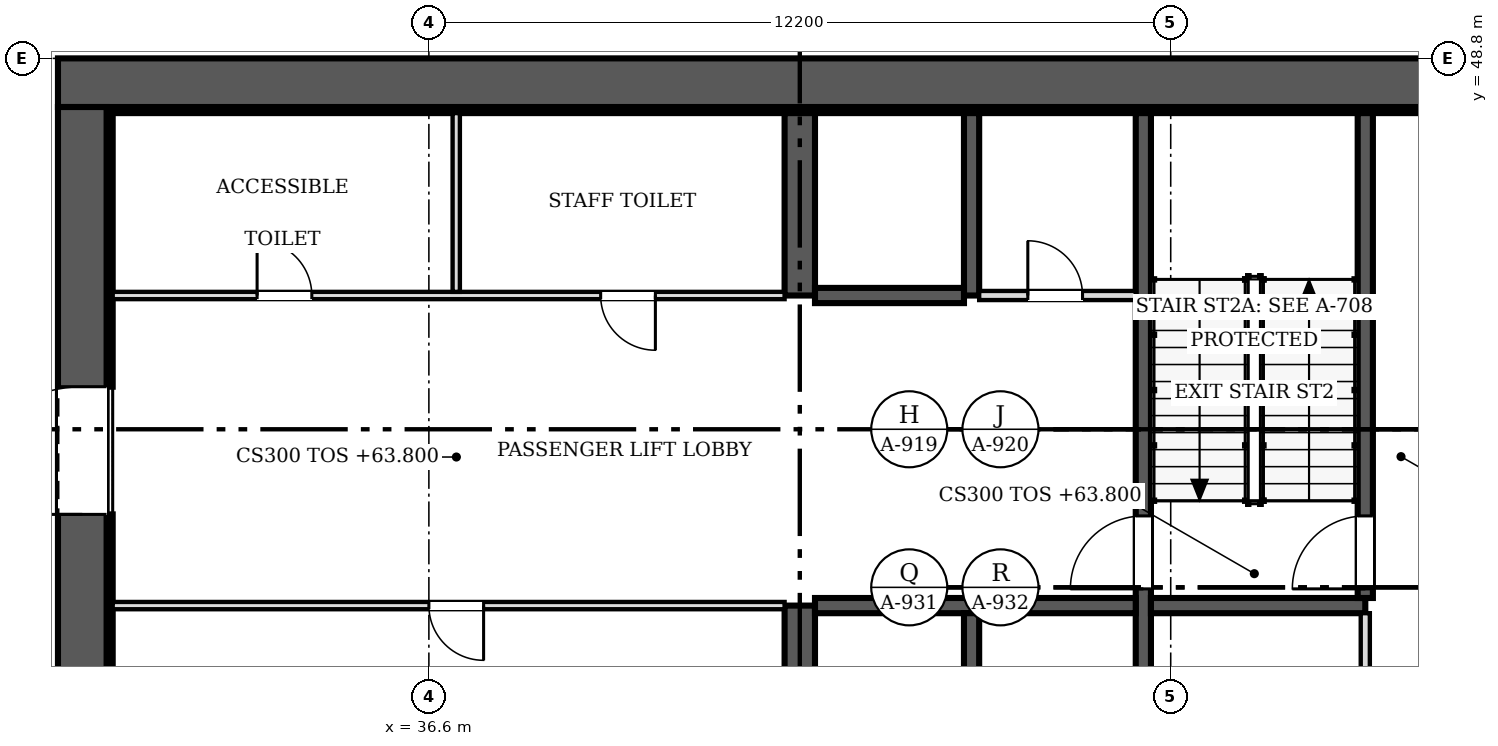
"""IFC4 building model, lengths in metres.
Left out: names, types, materials, properties, quantities, classifications, styles, units other than length and angle.
Written with IfcOpenShell. Run it as: python <this file> out.ifc"""

import sys

from ifc_helpers import new_model, si_unit, direction, frame, frame_2d, origin, place, context, subcontext, project, spatial, rectangle, extrude, source, transform, mapped, element, fill, save


model = new_model("IFC4")
c1 = context("Model", 3, precision=1e-05, world=origin(), true_north=direction((0.0, 1.0)))
c2 = subcontext(c1, "Body", "Model", "MODEL_VIEW")
j1 = project(units=[si_unit("LENGTHUNIT", "METRE"), si_unit("PLANEANGLEUNIT", "RADIAN")], contexts=[c1])
p1 = place(None, origin())
s1 = spatial("IfcSite", under=j1, at=p1, CompositionType="ELEMENT")
p2 = place(p1, origin())
s2 = spatial("IfcBuilding", under=s1, at=p2, CompositionType="ELEMENT")
p3 = place(p2, frame((0.0, 0.0, 63.8)))
s3 = spatial("IfcBuildingStorey", under=s2, at=p3, CompositionType="ELEMENT", Elevation=63.8)
p4 = place(p3, frame((30.9, 25.2, 0.0), z_axis=(0.0, 0.0, 1.0), x_axis=(0.0, 1.0, 0.0)))
e1 = element("IfcWall", 1, at=p4, inside=s3, PredefinedType="SHEAR", context=c2, shape_type="SweptSolid", body=[
    extrude(rectangle(XDim=22.8, YDim=0.8, at=frame_2d((11.4, 0.0))), origin(), (0.0, 0.0, 1.0), 4.8),
])
m1 = source(origin(), c2, "Body", "SweptSolid", [
    extrude(rectangle(XDim=2.1, YDim=2.4, at=frame_2d((1.05, 1.2))), frame((0.0, 0.41, 0.0), z_axis=(0.0, -1.0, 0.0), x_axis=(1.0, 0.0, 0.0)), (0.0, 0.0, 1.0), 0.82),
])
p5 = place(p4, frame((4.6, 0.0, 0.0)))
e2 = element("IfcOpeningElement", 2, at=p5, cuts=e1, PredefinedType="OPENING", context=c2, shape_type="MappedRepresentation", body=[
    mapped(m1, transform((0.0, 0.0, 0.0), scale=1.0)),
])
p6 = place(p4, frame((16.1, 0.0, 0.0)))
e3 = element("IfcOpeningElement", 3, at=p6, cuts=e1, PredefinedType="OPENING", context=c2, shape_type="MappedRepresentation", body=[
    mapped(m1, transform((0.0, 0.0, 0.0), scale=1.0)),
])
p7 = place(p3, frame((30.5, 48.4, 0.0), z_axis=(0.0, 0.0, 1.0), x_axis=(1.0, 0.0, 0.0)))
e4 = element("IfcWall", 4, at=p7, inside=s3, PredefinedType="SHEAR", context=c2, shape_type="SweptSolid", body=[
    extrude(rectangle(XDim=24.4, YDim=0.8, at=frame_2d((12.2, 0.0))), origin(), (0.0, 0.0, 1.0), 4.8),
])
p8 = place(p3, frame((31.3, 47.95, 0.0), z_axis=(0.0, 0.0, 1.0), x_axis=(1.0, 0.0, 0.0)))
e5 = element("IfcWall", 5, at=p8, inside=s3, PredefinedType="SOLIDWALL", context=c2, shape_type="SweptSolid", body=[
    extrude(rectangle(XDim=22.8, YDim=0.1, at=frame_2d((11.4, 0.0))), origin(), (0.0, 0.0, 1.0), 4.8),
])
p9 = place(p3, frame((31.35, 31.9, 0.0), z_axis=(0.0, 0.0, 1.0), x_axis=(0.0, 1.0, 0.0)))
e6 = element("IfcWall", 6, at=p9, inside=s3, PredefinedType="SOLIDWALL", context=c2, shape_type="SweptSolid", body=[
    extrude(rectangle(XDim=9.4, YDim=0.1, at=frame_2d((4.7, 0.0))), origin(), (0.0, 0.0, 1.0), 4.8),
])
p10 = place(p3, frame((31.35, 43.4, 0.0), z_axis=(0.0, 0.0, 1.0), x_axis=(0.0, 1.0, 0.0)))
e7 = element("IfcWall", 7, at=p10, inside=s3, PredefinedType="SOLIDWALL", context=c2, shape_type="SweptSolid", body=[
    extrude(rectangle(XDim=4.5, YDim=0.1, at=frame_2d((2.25, 0.0))), origin(), (0.0, 0.0, 1.0), 4.8),
])
p11 = place(p3, frame((42.7, 36.85, 0.0), z_axis=(0.0, 0.0, 1.0), x_axis=(0.0, 1.0, 0.0)))
e8 = element("IfcWall", 8, at=p11, inside=s3, PredefinedType="SHEAR", context=c2, shape_type="SweptSolid", body=[
    extrude(rectangle(XDim=2.95, YDim=0.5, at=frame_2d((1.475, 0.0))), origin(), (0.0, 0.0, 1.0), 4.8),
])
p12 = place(p3, frame((42.7, 44.9, 0.0), z_axis=(0.0, 0.0, 1.0), x_axis=(0.0, 1.0, 0.0)))
e9 = element("IfcWall", 9, at=p12, inside=s3, PredefinedType="SHEAR", context=c2, shape_type="SweptSolid", body=[
    extrude(rectangle(XDim=3.0, YDim=0.5, at=frame_2d((1.5, 0.0))), origin(), (0.0, 0.0, 1.0), 4.8),
])
p13 = place(p3, frame((48.35, 47.9, 0.0), z_axis=(0.0, 0.0, 1.0), x_axis=(0.0, -1.0, 0.0)))
e10 = element("IfcWall", 10, at=p13, inside=s3, PredefinedType="SOLIDWALL", context=c2, shape_type="SweptSolid", body=[
    extrude(rectangle(XDim=11.05, YDim=0.25, at=frame_2d((5.525, 0.0))), origin(), (0.0, 0.0, 1.0), 4.8),
])
m2 = source(origin(), c2, "Body", "SweptSolid", [
    extrude(rectangle(XDim=1.2, YDim=2.1, at=frame_2d((0.6, 1.05))), frame((0.0, 0.135, 0.0), z_axis=(0.0, -1.0, 0.0), x_axis=(1.0, 0.0, 0.0)), (0.0, 0.0, 1.0), 0.27),
])
p14 = place(p13, frame((6.625, 0.0, 0.0)))
e11 = element("IfcOpeningElement", 11, at=p14, cuts=e10, PredefinedType="OPENING", context=c2, shape_type="MappedRepresentation", body=[
    mapped(m2, transform((0.0, 0.0, 0.0), scale=1.0)),
])
p15 = place(p3, frame((42.95, 39.8, 0.0), z_axis=(0.0, 0.0, 1.0), x_axis=(1.0, 0.0, 0.0)))
e12 = element("IfcWall", 12, at=p15, inside=s3, PredefinedType="SOLIDWALL", context=c2, shape_type="SweptSolid", body=[
    extrude(rectangle(XDim=5.275, YDim=0.25, at=frame_2d((2.638, 0.0))), origin(), (0.0, 0.0, 1.0), 4.8),
])
p16 = place(p3, frame((48.475, 39.8, 0.0), z_axis=(0.0, 0.0, 1.0), x_axis=(1.0, 0.0, 0.0)))
e13 = element("IfcWall", 13, at=p16, inside=s3, PredefinedType="SOLIDWALL", context=c2, shape_type="SweptSolid", body=[
    extrude(rectangle(XDim=3.525, YDim=0.25, at=frame_2d((1.762, 0.0))), origin(), (0.0, 0.0, 1.0), 4.8),
])
p17 = place(p3, frame((52.0, 39.925, 0.0), z_axis=(0.0, 0.0, 1.0), x_axis=(0.0, 1.0, 0.0)))
e14 = element("IfcWall", 14, at=p17, inside=s3, PredefinedType="SOLIDWALL", context=c2, shape_type="SweptSolid", body=[
    extrude(rectangle(XDim=7.975, YDim=0.25, at=frame_2d((3.987, 0.0))), origin(), (0.0, 0.0, 1.0), 4.8),
])
p18 = place(p17, frame((0.15, 0.0, 0.0)))
e15 = element("IfcOpeningElement", 15, at=p18, cuts=e14, PredefinedType="OPENING", context=c2, shape_type="MappedRepresentation", body=[
    mapped(m2, transform((0.0, 0.0, 0.0), scale=1.0)),
])
p19 = place(p3, frame((45.525, 36.85, 0.0), z_axis=(0.0, 0.0, 1.0), x_axis=(0.0, 1.0, 0.0)))
e16 = element("IfcWall", 16, at=p19, inside=s3, PredefinedType="SOLIDWALL", context=c2, shape_type="SweptSolid", body=[
    extrude(rectangle(XDim=2.825, YDim=0.25, at=frame_2d((1.413, 0.0))), origin(), (0.0, 0.0, 1.0), 4.8),
])
p20 = place(p3, frame((45.525, 44.9, 0.0), z_axis=(0.0, 0.0, 1.0), x_axis=(0.0, 1.0, 0.0)))
e17 = element("IfcWall", 17, at=p20, inside=s3, PredefinedType="SOLIDWALL", context=c2, shape_type="SweptSolid", body=[
    extrude(rectangle(XDim=3.0, YDim=0.25, at=frame_2d((1.5, 0.0))), origin(), (0.0, 0.0, 1.0), 4.8),
])
p21 = place(p3, frame((42.95, 44.9, 0.0), z_axis=(0.0, 0.0, 1.0), x_axis=(1.0, 0.0, 0.0)))
e18 = element("IfcWall", 18, at=p21, inside=s3, PredefinedType="SOLIDWALL", context=c2, shape_type="SweptSolid", body=[
    extrude(rectangle(XDim=2.45, YDim=0.25, at=frame_2d((1.225, 0.0))), origin(), (0.0, 0.0, 1.0), 4.8),
])
p22 = place(p3, frame((42.45, 39.8, 0.0), z_axis=(0.0, 0.0, 1.0), x_axis=(-1.0, 0.0, 0.0)))
e19 = element("IfcWall", 19, at=p22, inside=s3, PredefinedType="PARTITIONING", context=c2, shape_type="SweptSolid", body=[
    extrude(rectangle(XDim=11.05, YDim=0.12, at=frame_2d((5.525, 0.0))), origin(), (0.0, 0.0, 1.0), 4.6),
])
m3 = source(origin(), c2, "Body", "SweptSolid", [
    extrude(rectangle(XDim=0.9, YDim=2.1, at=frame_2d((0.45, 1.05))), frame((0.0, 0.07, 0.0), z_axis=(0.0, -1.0, 0.0), x_axis=(1.0, 0.0, 0.0)), (0.0, 0.0, 1.0), 0.14),
])
p23 = place(p22, frame((4.95, 0.0, 0.0)))
e20 = element("IfcOpeningElement", 20, at=p23, cuts=e19, PredefinedType="OPENING", context=c2, shape_type="MappedRepresentation", body=[
    mapped(m3, transform((0.0, 0.0, 0.0), scale=1.0)),
])
p24 = place(p3, frame((31.4, 44.9, 0.0), z_axis=(0.0, 0.0, 1.0), x_axis=(1.0, 0.0, 0.0)))
e21 = element("IfcWall", 21, at=p24, inside=s3, PredefinedType="PARTITIONING", context=c2, shape_type="SweptSolid", body=[
    extrude(rectangle(XDim=11.05, YDim=0.12, at=frame_2d((5.525, 0.0))), origin(), (0.0, 0.0, 1.0), 4.6),
])
p25 = place(p24, frame((2.375, 0.0, 0.0)))
e22 = element("IfcOpeningElement", 22, at=p25, cuts=e21, PredefinedType="OPENING", context=c2, shape_type="MappedRepresentation", body=[
    mapped(m3, transform((0.0, 0.0, 0.0), scale=1.0)),
])
p26 = place(p24, frame((8.025, 0.0, 0.0)))
e23 = element("IfcOpeningElement", 23, at=p26, cuts=e21, PredefinedType="OPENING", context=c2, shape_type="MappedRepresentation", body=[
    mapped(m3, transform((0.0, 0.0, 0.0), scale=1.0)),
])
p27 = place(p3, frame((52.0, 33.525, 0.0), z_axis=(0.0, 0.0, 1.0), x_axis=(0.0, 1.0, 0.0)))
e24 = element("IfcWall", 24, at=p27, inside=s3, PredefinedType="PARTITIONING", context=c2, shape_type="SweptSolid", body=[
    extrude(rectangle(XDim=6.15, YDim=0.15, at=frame_2d((3.075, 0.0))), origin(), (0.0, 0.0, 1.0), 4.6),
])
m4 = source(origin(), c2, "Body", "SweptSolid", [
    extrude(rectangle(XDim=0.9, YDim=2.1, at=frame_2d((0.45, 1.05))), frame((0.0, 0.085, 0.0), z_axis=(0.0, -1.0, 0.0), x_axis=(1.0, 0.0, 0.0)), (0.0, 0.0, 1.0), 0.17),
])
p28 = place(p27, frame((1.025, 0.0, 0.0)))
e25 = element("IfcOpeningElement", 25, at=p28, cuts=e24, PredefinedType="OPENING", context=c2, shape_type="MappedRepresentation", body=[
    mapped(m4, transform((0.0, 0.0, 0.0), scale=1.0)),
])
p29 = place(p3, frame((37.05, 44.96, 0.0), z_axis=(0.0, 0.0, 1.0), x_axis=(0.0, 1.0, 0.0)))
e26 = element("IfcWall", 26, at=p29, inside=s3, PredefinedType="PARTITIONING", context=c2, shape_type="SweptSolid", body=[
    extrude(rectangle(XDim=2.94, YDim=0.12, at=frame_2d((1.47, 0.0))), origin(), (0.0, 0.0, 1.0), 4.6),
])
p30 = place(p3, frame((45.65, 44.9, 0.0), z_axis=(0.0, 0.0, 1.0), x_axis=(1.0, 0.0, 0.0)))
e27 = element("IfcWall", 27, at=p30, inside=s3, PredefinedType="PARTITIONING", context=c2, shape_type="SweptSolid", body=[
    extrude(rectangle(XDim=2.575, YDim=0.15, at=frame_2d((1.288, 0.0))), origin(), (0.0, 0.0, 1.0), 4.6),
])
p31 = place(p30, frame((0.8, 0.0, 0.0)))
e28 = element("IfcOpeningElement", 28, at=p31, cuts=e27, PredefinedType="OPENING", context=c2, shape_type="MappedRepresentation", body=[
    mapped(m4, transform((0.0, 0.0, 0.0), scale=1.0)),
])
m5 = source(origin(), c2, "Body", "SweptSolid", [
    extrude(rectangle(XDim=2.1, YDim=2.4, at=frame_2d((1.05, 1.2))), frame((0.0, 0.025, 0.0), z_axis=(0.0, -1.0, 0.0), x_axis=(1.0, 0.0, 0.0)), (0.0, 0.0, 1.0), 0.05),
])
p32 = place(p6, origin())
e29 = element("IfcDoor", 29, at=p32, inside=s3, OperationType="DOUBLE_DOOR_SINGLE_SWING", PredefinedType="DOOR", context=c2, shape_type="MappedRepresentation", body=[
    mapped(m5, transform((0.0, 0.0, 0.0), scale=1.0)),
])
fill(e3, e29)
m6 = source(origin(), c2, "Body", "SweptSolid", [
    extrude(rectangle(XDim=1.2, YDim=2.1, at=frame_2d((0.6, 1.05))), frame((0.0, 0.025, 0.0), z_axis=(0.0, -1.0, 0.0), x_axis=(1.0, 0.0, 0.0)), (0.0, 0.0, 1.0), 0.05),
])
p33 = place(p14, origin())
e30 = element("IfcDoor", 30, at=p33, inside=s3, OperationType="SINGLE_SWING_RIGHT", PredefinedType="DOOR", context=c2, shape_type="MappedRepresentation", body=[
    mapped(m6, transform((0.0, 0.0, 0.0), scale=1.0)),
])
fill(e11, e30)
p34 = place(p18, origin())
e31 = element("IfcDoor", 31, at=p34, inside=s3, OperationType="SINGLE_SWING_LEFT", PredefinedType="DOOR", context=c2, shape_type="MappedRepresentation", body=[
    mapped(m6, transform((0.0, 0.0, 0.0), scale=1.0)),
])
fill(e15, e31)
m7 = source(origin(), c2, "Body", "SweptSolid", [
    extrude(rectangle(XDim=0.9, YDim=2.1, at=frame_2d((0.45, 1.05))), frame((0.0, 0.025, 0.0), z_axis=(0.0, -1.0, 0.0), x_axis=(1.0, 0.0, 0.0)), (0.0, 0.0, 1.0), 0.05),
])
p35 = place(p23, origin())
e32 = element("IfcDoor", 32, at=p35, inside=s3, OperationType="SINGLE_SWING_LEFT", PredefinedType="DOOR", context=c2, shape_type="MappedRepresentation", body=[
    mapped(m7, transform((0.0, 0.0, 0.0), scale=1.0)),
])
fill(e20, e32)
p36 = place(p25, origin())
e33 = element("IfcDoor", 33, at=p36, inside=s3, OperationType="SINGLE_SWING_LEFT", PredefinedType="DOOR", context=c2, shape_type="MappedRepresentation", body=[
    mapped(m7, transform((0.0, 0.0, 0.0), scale=1.0)),
])
fill(e22, e33)
p37 = place(p26, origin())
e34 = element("IfcDoor", 34, at=p37, inside=s3, OperationType="SINGLE_SWING_RIGHT", PredefinedType="DOOR", context=c2, shape_type="MappedRepresentation", body=[
    mapped(m7, transform((0.0, 0.0, 0.0), scale=1.0)),
])
fill(e23, e34)
p38 = place(p31, origin())
e35 = element("IfcDoor", 35, at=p38, inside=s3, OperationType="SINGLE_SWING_LEFT", PredefinedType="DOOR", context=c2, shape_type="MappedRepresentation", body=[
    mapped(m7, transform((0.0, 0.0, 0.0), scale=1.0)),
])
fill(e28, e35)
save(model, sys.argv[1])
